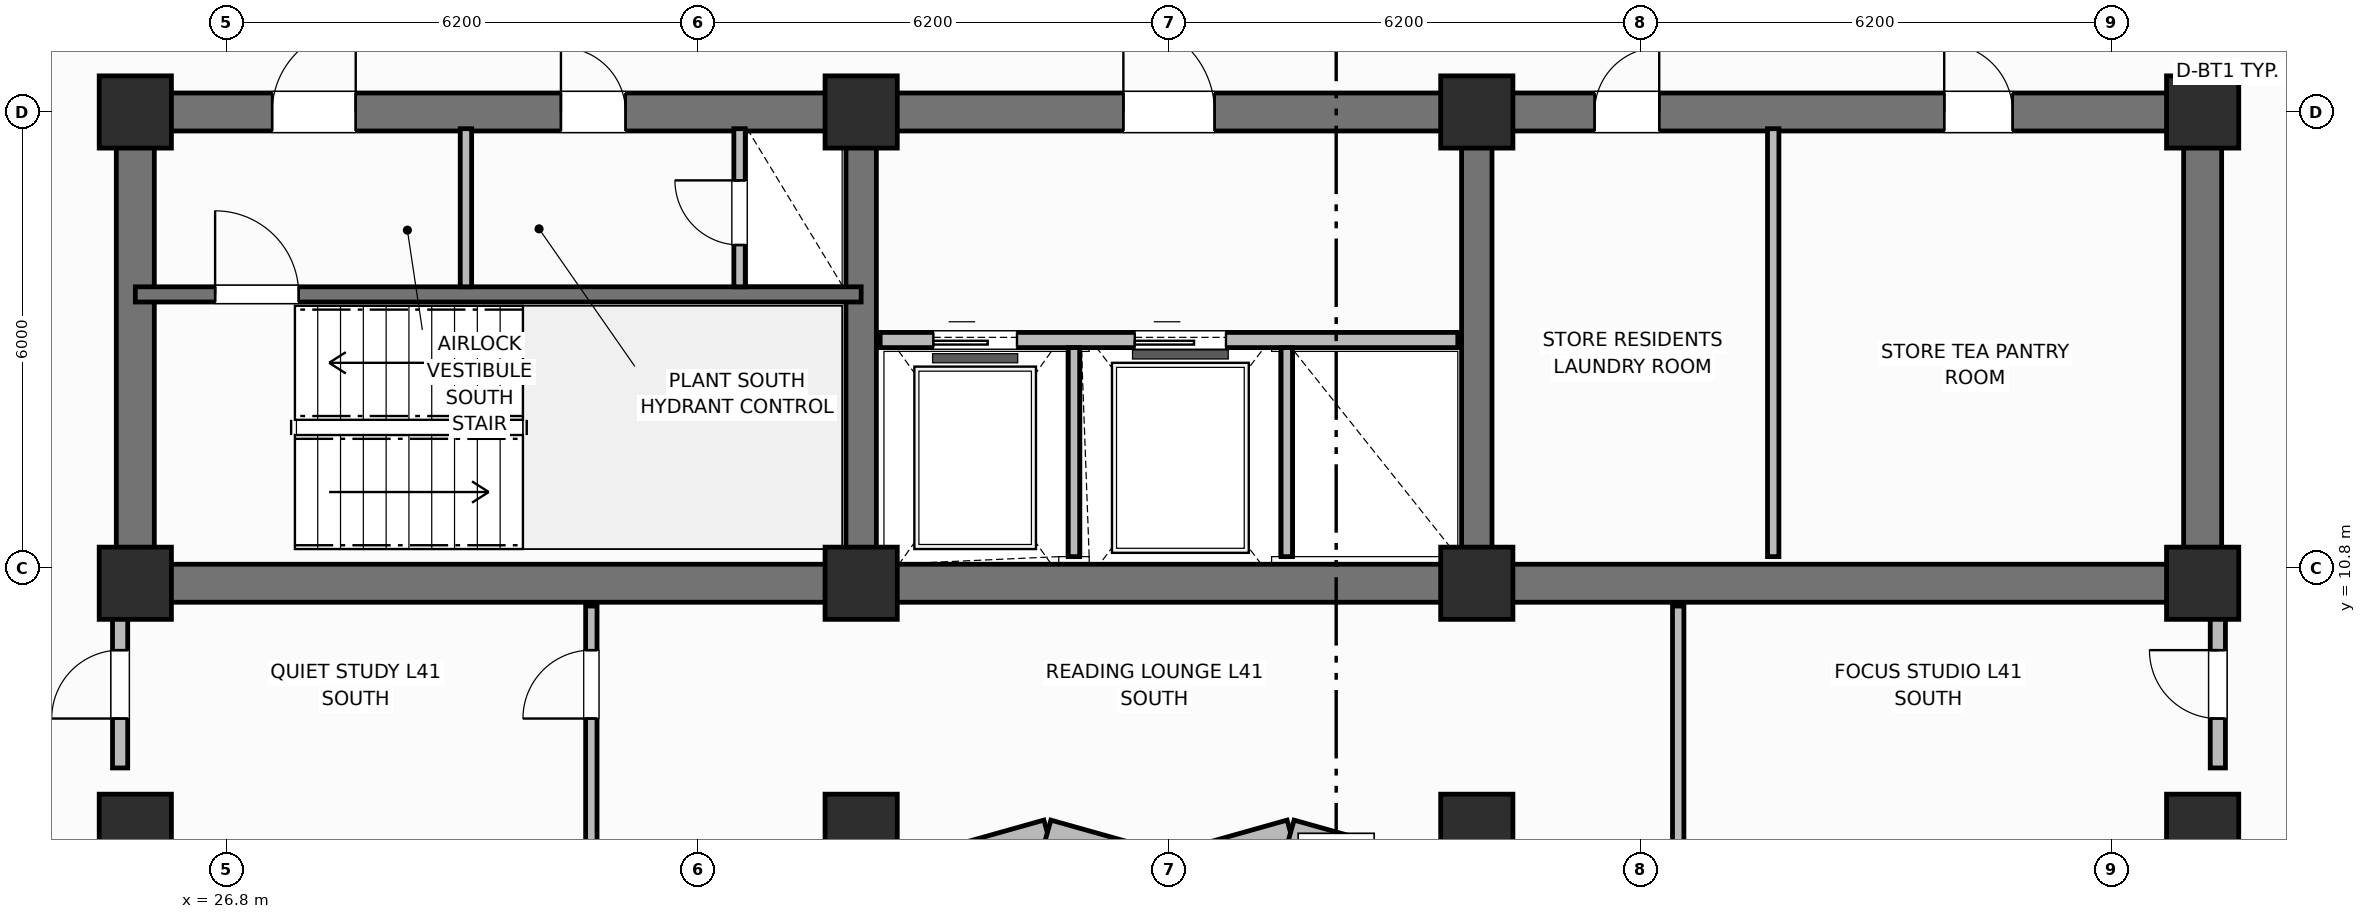
"""IFC4 building model, lengths in metres.
Left out: names, types, materials, properties, quantities, classifications, styles, units other than length and angle.
Written with IfcOpenShell. Run it as: python <this file> out.ifc"""

import sys

from ifc_helpers import new_model, si_unit, direction, frame, frame_2d, origin, origin_2d, place, context, subcontext, project, spatial, rectangle, extrude, element, fill, save


model = new_model("IFC4")
c1 = context("Model", 3, precision=1e-05, world=origin(), true_north=direction((0.0, 1.0)))
c2 = subcontext(c1, "Body", "Model", "MODEL_VIEW")
j1 = project(units=[si_unit("LENGTHUNIT", "METRE"), si_unit("PLANEANGLEUNIT", "RADIAN")], contexts=[c1])
p1 = place(None, origin())
s1 = spatial("IfcSite", under=j1, at=p1, CompositionType="ELEMENT")
p2 = place(p1, origin())
s2 = spatial("IfcBuilding", under=s1, at=p2, CompositionType="ELEMENT")
p3 = place(p2, frame((0.0, 0.0, 166.3)))
s3 = spatial("IfcBuildingStorey", under=s2, at=p3, CompositionType="ELEMENT", Elevation=166.3)
p4 = place(p3, frame((52.8, 10.6, 0.0), z_axis=(0.0, 0.0, 1.0), x_axis=(-1.0, 0.0, 0.0)))
e1 = element("IfcWall", 1, at=p4, inside=s3, PredefinedType="SHEAR", context=c2, shape_type="SweptSolid", body=[
    extrude(rectangle(XDim=27.2, YDim=0.5, at=frame_2d((13.6, 0.0))), origin(), (0.0, 0.0, 1.0), 3.7),
])
for number, where, z_axis, x_axis in (
    (2, (25.6, 10.85, 0.0), (0.0, 0.0, 1.0), (0.0, 1.0, 0.0)),
    (3, (52.8, 10.85, 0.0), (0.0, 0.0, 1.0), (0.0, 1.0, 0.0)),
):
    element("IfcWall", number, at=place(p3, frame(where, z_axis=z_axis, x_axis=x_axis)), inside=s3, PredefinedType="SHEAR", context=c2, shape_type="SweptSolid", body=[
        extrude(rectangle(XDim=5.7, YDim=0.5, at=frame_2d((2.85, 0.0))), origin(), (0.0, 0.0, 1.0), 3.7),
    ])
p5 = place(p3, frame((25.6, 16.8, 0.0), z_axis=(0.0, 0.0, 1.0), x_axis=(1.0, 0.0, 0.0)))
e4 = element("IfcWall", 4, at=p5, inside=s3, PredefinedType="SHEAR", context=c2, shape_type="SweptSolid", body=[
    extrude(rectangle(XDim=27.2, YDim=0.5, at=frame_2d((13.6, 0.0))), origin(), (0.0, 0.0, 1.0), 3.7),
])
p6 = place(p5, frame((1.8, 0.0, 0.0)))
e5 = element("IfcOpeningElement", 5, at=p6, cuts=e4, PredefinedType="OPENING", context=c2, shape_type="SweptSolid", body=[
    extrude(rectangle(XDim=1.1, YDim=2.15, at=frame_2d((0.55, 1.075))), frame((0.0, 0.26, 0.0), z_axis=(0.0, -1.0, 0.0), x_axis=(1.0, 0.0, 0.0)), (0.0, 0.0, 1.0), 0.52),
])
p7 = place(p5, frame((5.6, 0.0, 0.0)))
e6 = element("IfcOpeningElement", 6, at=p7, cuts=e4, PredefinedType="OPENING", context=c2, shape_type="SweptSolid", body=[
    extrude(rectangle(XDim=0.85, YDim=2.1, at=frame_2d((0.425, 1.05))), frame((0.0, 0.26, 0.0), z_axis=(0.0, -1.0, 0.0), x_axis=(1.0, 0.0, 0.0)), (0.0, 0.0, 1.0), 0.52),
])
p8 = place(p5, frame((13.0, 0.0, 0.0)))
e7 = element("IfcOpeningElement", 7, at=p8, cuts=e4, PredefinedType="OPENING", context=c2, shape_type="SweptSolid", body=[
    extrude(rectangle(XDim=1.2, YDim=2.15, at=frame_2d((0.6, 1.075))), frame((0.0, 0.26, 0.0), z_axis=(0.0, -1.0, 0.0), x_axis=(1.0, 0.0, 0.0)), (0.0, 0.0, 1.0), 0.52),
])
p9 = place(p5, frame((19.2, 0.0, 0.0)))
e8 = element("IfcOpeningElement", 8, at=p9, cuts=e4, PredefinedType="OPENING", context=c2, shape_type="SweptSolid", body=[
    extrude(rectangle(XDim=0.85, YDim=2.1, at=frame_2d((0.425, 1.05))), frame((0.0, 0.26, 0.0), z_axis=(0.0, -1.0, 0.0), x_axis=(1.0, 0.0, 0.0)), (0.0, 0.0, 1.0), 0.52),
])
p10 = place(p5, frame((23.8, 0.0, 0.0)))
e9 = element("IfcOpeningElement", 9, at=p10, cuts=e4, PredefinedType="OPENING", context=c2, shape_type="SweptSolid", body=[
    extrude(rectangle(XDim=0.9, YDim=2.1, at=frame_2d((0.45, 1.05))), frame((0.0, 0.26, 0.0), z_axis=(0.0, -1.0, 0.0), x_axis=(1.0, 0.0, 0.0)), (0.0, 0.0, 1.0), 0.52),
])
for number, where, z_axis, x_axis in (
    (10, (35.15, 10.85, 0.0), (0.0, 0.0, 1.0), (0.0, 1.0, 0.0)),
    (11, (43.25, 10.85, 0.0), (0.0, 0.0, 1.0), (0.0, 1.0, 0.0)),
):
    element("IfcWall", number, at=place(p3, frame(where, z_axis=z_axis, x_axis=x_axis)), inside=s3, PredefinedType="SHEAR", context=c2, shape_type="SweptSolid", body=[
        extrude(rectangle(XDim=5.7, YDim=0.4, at=frame_2d((2.85, 0.0))), origin(), (0.0, 0.0, 1.0), 3.7),
    ])
for number, where, z_axis, x_axis in (
    (12, (25.6, 10.6, 0.0), (0.0, 0.0, 1.0), (1.0, 0.0, 0.0)),
    (13, (25.6, 16.8, 0.0), (0.0, 0.0, 1.0), (1.0, 0.0, 0.0)),
    (14, (35.15, 10.6, 0.0), (0.0, 0.0, 1.0), (1.0, 0.0, 0.0)),
    (15, (35.15, 16.8, 0.0), (0.0, 0.0, 1.0), (1.0, 0.0, 0.0)),
    (16, (43.25, 10.6, 0.0), (0.0, 0.0, 1.0), (1.0, 0.0, 0.0)),
    (17, (43.25, 16.8, 0.0), (0.0, 0.0, 1.0), (1.0, 0.0, 0.0)),
    (18, (52.8, 10.6, 0.0), (0.0, 0.0, 1.0), (1.0, 0.0, 0.0)),
    (19, (52.8, 16.8, 0.0), (0.0, 0.0, 1.0), (1.0, 0.0, 0.0)),
    (20, (25.6, 7.35, 0.0), (0.0, 0.0, 1.0), (1.0, 0.0, 0.0)),
    (21, (35.15, 7.35, 0.0), (0.0, 0.0, 1.0), (1.0, 0.0, 0.0)),
    (22, (43.25, 7.35, 0.0), (0.0, 0.0, 1.0), (1.0, 0.0, 0.0)),
    (23, (52.8, 7.35, 0.0), (0.0, 0.0, 1.0), (1.0, 0.0, 0.0)),
):
    element("IfcColumn", number, at=place(p3, frame(where, z_axis=z_axis, x_axis=x_axis)), inside=s3, PredefinedType="COLUMN", context=c2, shape_type="SweptSolid", body=[
        extrude(rectangle(XDim=0.95, YDim=0.95, at=origin_2d()), origin(), (0.0, 0.0, 1.0), 3.7),
    ])
p11 = place(p3, frame((36.0, 6.87, 0.0), z_axis=(0.0, 0.0, 1.0), x_axis=(0.962662902433, 0.270703040766, 0.0)))
e24 = element("IfcWall", 24, at=p11, inside=s3, PredefinedType="SOLIDWALL", context=c2, shape_type="SweptSolid", body=[
    extrude(rectangle(XDim=1.662, YDim=0.34, at=frame_2d((0.831, 0.0))), origin(), (0.0, 0.0, 1.0), 2.72),
])
p12 = place(p3, frame((37.6, 7.32, 0.0), z_axis=(0.0, 0.0, 1.0), x_axis=(0.962652136636, -0.270741322725, 0.0)))
e25 = element("IfcWall", 25, at=p12, inside=s3, PredefinedType="SOLIDWALL", context=c2, shape_type="SweptSolid", body=[
    extrude(rectangle(XDim=1.662, YDim=0.34, at=frame_2d((0.831, 0.0))), origin(), (0.0, 0.0, 1.0), 2.72),
])
p13 = place(p3, frame((39.2, 6.87, 0.0), z_axis=(0.0, 0.0, 1.0), x_axis=(0.962662902433, 0.270703040766, 0.0)))
e26 = element("IfcWall", 26, at=p13, inside=s3, PredefinedType="SOLIDWALL", context=c2, shape_type="SweptSolid", body=[
    extrude(rectangle(XDim=1.662, YDim=0.34, at=frame_2d((0.831, 0.0))), origin(), (0.0, 0.0, 1.0), 2.72),
])
p14 = place(p3, frame((40.8, 7.32, 0.0), z_axis=(0.0, 0.0, 1.0), x_axis=(0.962652136636, -0.270741322725, 0.0)))
e27 = element("IfcWall", 27, at=p14, inside=s3, PredefinedType="SOLIDWALL", context=c2, shape_type="SweptSolid", body=[
    extrude(rectangle(XDim=1.662, YDim=0.34, at=frame_2d((0.831, 0.0))), origin(), (0.0, 0.0, 1.0), 2.72),
])
p15 = place(p3, frame((25.6, 14.4, 0.0), z_axis=(0.0, 0.0, 1.0), x_axis=(1.0, 0.0, 0.0)))
e28 = element("IfcWall", 28, at=p15, inside=s3, PredefinedType="SHEAR", context=c2, shape_type="SweptSolid", body=[
    extrude(rectangle(XDim=9.55, YDim=0.2, at=frame_2d((4.775, 0.0))), origin(), (0.0, 0.0, 1.0), 3.7),
])
p16 = place(p15, frame((1.05, 0.0, 0.0)))
e29 = element("IfcOpeningElement", 29, at=p16, cuts=e28, PredefinedType="OPENING", context=c2, shape_type="SweptSolid", body=[
    extrude(rectangle(XDim=1.1, YDim=2.15, at=frame_2d((0.55, 1.075))), frame((0.0, 0.11, 0.0), z_axis=(0.0, -1.0, 0.0), x_axis=(1.0, 0.0, 0.0)), (0.0, 0.0, 1.0), 0.22),
])
p17 = place(p3, frame((29.95, 14.5, 0.0), z_axis=(0.0, 0.0, 1.0), x_axis=(0.0, 1.0, 0.0)))
e30 = element("IfcWall", 30, at=p17, inside=s3, PredefinedType="PARTITIONING", context=c2, shape_type="SweptSolid", body=[
    extrude(rectangle(XDim=2.08, YDim=0.15, at=frame_2d((1.04, 0.0))), origin(), (0.0, 0.0, 1.0), 2.55),
])
p18 = place(p3, frame((33.55, 14.5, 0.0), z_axis=(0.0, 0.0, 1.0), x_axis=(0.0, 1.0, 0.0)))
e31 = element("IfcWall", 31, at=p18, inside=s3, PredefinedType="PARTITIONING", context=c2, shape_type="SweptSolid", body=[
    extrude(rectangle(XDim=2.08, YDim=0.15, at=frame_2d((1.04, 0.0))), origin(), (0.0, 0.0, 1.0), 2.55),
])
p19 = place(p18, frame((0.55, 0.0, 0.0)))
e32 = element("IfcOpeningElement", 32, at=p19, cuts=e31, PredefinedType="OPENING", context=c2, shape_type="SweptSolid", body=[
    extrude(rectangle(XDim=0.85, YDim=2.05, at=frame_2d((0.425, 1.025))), frame((0.0, 0.085, 0.0), z_axis=(0.0, -1.0, 0.0), x_axis=(1.0, 0.0, 0.0)), (0.0, 0.0, 1.0), 0.17),
])
p20 = place(p3, frame((35.4, 13.8, 0.0), z_axis=(0.0, 0.0, 1.0), x_axis=(1.0, 0.0, 0.0)))
e33 = element("IfcWall", 33, at=p20, inside=s3, PredefinedType="PARTITIONING", context=c2, shape_type="SweptSolid", body=[
    extrude(rectangle(XDim=7.6, YDim=0.2, at=frame_2d((3.8, 0.0))), origin(), (0.0, 0.0, 1.0), 2.32),
])
p21 = place(p20, frame((0.7, 0.0, 0.0)))
e34 = element("IfcOpeningElement", 34, at=p21, cuts=e33, PredefinedType="OPENING", context=c2, shape_type="SweptSolid", body=[
    extrude(rectangle(XDim=1.1, YDim=2.15, at=frame_2d((0.55, 1.075))), frame((0.0, 0.11, 0.0), z_axis=(0.0, -1.0, 0.0), x_axis=(1.0, 0.0, 0.0)), (0.0, 0.0, 1.0), 0.22),
])
p22 = place(p20, frame((3.35, 0.0, 0.0)))
e35 = element("IfcOpeningElement", 35, at=p22, cuts=e33, PredefinedType="OPENING", context=c2, shape_type="SweptSolid", body=[
    extrude(rectangle(XDim=1.2, YDim=2.15, at=frame_2d((0.6, 1.075))), frame((0.0, 0.11, 0.0), z_axis=(0.0, -1.0, 0.0), x_axis=(1.0, 0.0, 0.0)), (0.0, 0.0, 1.0), 0.22),
])
for number, where, z_axis, x_axis in (
    (36, (37.95, 10.95, 0.0), (0.0, 0.0, 1.0), (0.0, 1.0, 0.0)),
    (37, (40.75, 10.95, 0.0), (0.0, 0.0, 1.0), (0.0, 1.0, 0.0)),
):
    element("IfcWall", number, at=place(p3, frame(where, z_axis=z_axis, x_axis=x_axis)), inside=s3, PredefinedType="PARTITIONING", context=c2, shape_type="SweptSolid", body=[
        extrude(rectangle(XDim=2.75, YDim=0.15, at=frame_2d((1.375, 0.0))), origin(), (0.0, 0.0, 1.0), 2.55),
    ])
p23 = place(p3, frame((47.15, 10.95, 0.0), z_axis=(0.0, 0.0, 1.0), x_axis=(0.0, 1.0, 0.0)))
e38 = element("IfcWall", 38, at=p23, inside=s3, PredefinedType="PARTITIONING", context=c2, shape_type="SweptSolid", body=[
    extrude(rectangle(XDim=5.63, YDim=0.15, at=frame_2d((2.815, 0.0))), origin(), (0.0, 0.0, 1.0), 2.55),
])
p24 = place(p3, frame((31.6, 6.87, 0.0), z_axis=(0.0, 0.0, 1.0), x_axis=(0.0, 1.0, 0.0)))
e39 = element("IfcWall", 39, at=p24, inside=s3, PredefinedType="PARTITIONING", context=c2, shape_type="SweptSolid", body=[
    extrude(rectangle(XDim=3.43, YDim=0.15, at=frame_2d((1.715, 0.0))), origin(), (0.0, 0.0, 1.0), 2.55),
])
p25 = place(p24, frame((1.95, 0.0, 0.0)))
e40 = element("IfcOpeningElement", 40, at=p25, cuts=e39, PredefinedType="OPENING", context=c2, shape_type="SweptSolid", body=[
    extrude(rectangle(XDim=0.9, YDim=2.1, at=frame_2d((0.45, 1.05))), frame((0.0, 0.085, 0.0), z_axis=(0.0, -1.0, 0.0), x_axis=(1.0, 0.0, 0.0)), (0.0, 0.0, 1.0), 0.17),
])
p26 = place(p3, frame((45.9, 6.87, 0.0), z_axis=(0.0, 0.0, 1.0), x_axis=(0.0, 1.0, 0.0)))
e41 = element("IfcWall", 41, at=p26, inside=s3, PredefinedType="PARTITIONING", context=c2, shape_type="SweptSolid", body=[
    extrude(rectangle(XDim=3.43, YDim=0.15, at=frame_2d((1.715, 0.0))), origin(), (0.0, 0.0, 1.0), 2.55),
])
p27 = place(p3, frame((25.4, 8.17, 0.0), z_axis=(0.0, 0.0, 1.0), x_axis=(0.0, 1.0, 0.0)))
e42 = element("IfcWall", 42, at=p27, inside=s3, PredefinedType="PARTITIONING", context=c2, shape_type="SweptSolid", body=[
    extrude(rectangle(XDim=2.13, YDim=0.2, at=frame_2d((1.065, 0.0))), origin(), (0.0, 0.0, 1.0), 2.55),
])
p28 = place(p27, frame((0.65, 0.0, 0.0)))
e43 = element("IfcOpeningElement", 43, at=p28, cuts=e42, PredefinedType="OPENING", context=c2, shape_type="SweptSolid", body=[
    extrude(rectangle(XDim=0.9, YDim=2.1, at=frame_2d((0.45, 1.05))), frame((0.0, 0.11, 0.0), z_axis=(0.0, -1.0, 0.0), x_axis=(1.0, 0.0, 0.0)), (0.0, 0.0, 1.0), 0.22),
])
p29 = place(p3, frame((53.0, 8.17, 0.0), z_axis=(0.0, 0.0, 1.0), x_axis=(0.0, 1.0, 0.0)))
e44 = element("IfcWall", 44, at=p29, inside=s3, PredefinedType="PARTITIONING", context=c2, shape_type="SweptSolid", body=[
    extrude(rectangle(XDim=2.13, YDim=0.2, at=frame_2d((1.065, 0.0))), origin(), (0.0, 0.0, 1.0), 2.55),
])
p30 = place(p29, frame((0.65, 0.0, 0.0)))
e45 = element("IfcOpeningElement", 45, at=p30, cuts=e44, PredefinedType="OPENING", context=c2, shape_type="SweptSolid", body=[
    extrude(rectangle(XDim=0.9, YDim=2.1, at=frame_2d((0.45, 1.05))), frame((0.0, 0.11, 0.0), z_axis=(0.0, -1.0, 0.0), x_axis=(1.0, 0.0, 0.0)), (0.0, 0.0, 1.0), 0.22),
])
p31 = place(p16, origin())
e46 = element("IfcDoor", 46, at=p31, inside=s3, OperationType="SINGLE_SWING_LEFT", PredefinedType="DOOR", context=c2, shape_type="SweptSolid", body=[
    extrude(rectangle(XDim=1.1, YDim=2.15, at=frame_2d((0.55, 1.075))), frame((0.0, 0.025, 0.0), z_axis=(0.0, -1.0, 0.0), x_axis=(1.0, 0.0, 0.0)), (0.0, 0.0, 1.0), 0.05),
])
fill(e29, e46)
p32 = place(p19, origin())
e47 = element("IfcDoor", 47, at=p32, inside=s3, OperationType="SINGLE_SWING_RIGHT", PredefinedType="TRAPDOOR", context=c2, shape_type="SweptSolid", body=[
    extrude(rectangle(XDim=0.85, YDim=2.05, at=frame_2d((0.425, 1.025))), frame((0.0, 0.025, 0.0), z_axis=(0.0, -1.0, 0.0), x_axis=(1.0, 0.0, 0.0)), (0.0, 0.0, 1.0), 0.05),
])
fill(e32, e47)
p33 = place(p21, origin())
e48 = element("IfcDoor", 48, at=p33, inside=s3, OperationType="SLIDING_TO_LEFT", PredefinedType="DOOR", context=c2, shape_type="SweptSolid", body=[
    extrude(rectangle(XDim=1.1, YDim=2.15, at=frame_2d((0.55, 1.075))), frame((0.0, 0.025, 0.0), z_axis=(0.0, -1.0, 0.0), x_axis=(1.0, 0.0, 0.0)), (0.0, 0.0, 1.0), 0.05),
])
fill(e34, e48)
p34 = place(p22, origin())
e49 = element("IfcDoor", 49, at=p34, inside=s3, OperationType="SLIDING_TO_LEFT", PredefinedType="DOOR", context=c2, shape_type="SweptSolid", body=[
    extrude(rectangle(XDim=1.2, YDim=2.15, at=frame_2d((0.6, 1.075))), frame((0.0, 0.025, 0.0), z_axis=(0.0, -1.0, 0.0), x_axis=(1.0, 0.0, 0.0)), (0.0, 0.0, 1.0), 0.05),
])
fill(e35, e49)
p35 = place(p25, origin())
e50 = element("IfcDoor", 50, at=p35, inside=s3, OperationType="SINGLE_SWING_LEFT", PredefinedType="DOOR", context=c2, shape_type="SweptSolid", body=[
    extrude(rectangle(XDim=0.9, YDim=2.1, at=frame_2d((0.45, 1.05))), frame((0.0, 0.025, 0.0), z_axis=(0.0, -1.0, 0.0), x_axis=(1.0, 0.0, 0.0)), (0.0, 0.0, 1.0), 0.05),
])
fill(e40, e50)
p36 = place(p28, origin())
e51 = element("IfcDoor", 51, at=p36, inside=s3, OperationType="SINGLE_SWING_LEFT", PredefinedType="DOOR", context=c2, shape_type="SweptSolid", body=[
    extrude(rectangle(XDim=0.9, YDim=2.1, at=frame_2d((0.45, 1.05))), frame((0.0, 0.025, 0.0), z_axis=(0.0, -1.0, 0.0), x_axis=(1.0, 0.0, 0.0)), (0.0, 0.0, 1.0), 0.05),
])
fill(e43, e51)
p37 = place(p30, origin())
e52 = element("IfcDoor", 52, at=p37, inside=s3, OperationType="SINGLE_SWING_RIGHT", PredefinedType="DOOR", context=c2, shape_type="SweptSolid", body=[
    extrude(rectangle(XDim=0.9, YDim=2.1, at=frame_2d((0.45, 1.05))), frame((0.0, 0.025, 0.0), z_axis=(0.0, -1.0, 0.0), x_axis=(1.0, 0.0, 0.0)), (0.0, 0.0, 1.0), 0.05),
])
fill(e45, e52)
p38 = place(p6, origin())
e53 = element("IfcDoor", 53, at=p38, inside=s3, OperationType="SINGLE_SWING_RIGHT", PredefinedType="DOOR", context=c2, shape_type="SweptSolid", body=[
    extrude(rectangle(XDim=1.1, YDim=2.15, at=frame_2d((0.55, 1.075))), frame((0.0, 0.025, 0.0), z_axis=(0.0, -1.0, 0.0), x_axis=(1.0, 0.0, 0.0)), (0.0, 0.0, 1.0), 0.05),
])
fill(e5, e53)
p39 = place(p7, origin())
e54 = element("IfcDoor", 54, at=p39, inside=s3, OperationType="SINGLE_SWING_LEFT", PredefinedType="DOOR", context=c2, shape_type="SweptSolid", body=[
    extrude(rectangle(XDim=0.85, YDim=2.1, at=frame_2d((0.425, 1.05))), frame((0.0, 0.025, 0.0), z_axis=(0.0, -1.0, 0.0), x_axis=(1.0, 0.0, 0.0)), (0.0, 0.0, 1.0), 0.05),
])
fill(e6, e54)
p40 = place(p8, origin())
e55 = element("IfcDoor", 55, at=p40, inside=s3, OperationType="SINGLE_SWING_LEFT", PredefinedType="DOOR", context=c2, shape_type="SweptSolid", body=[
    extrude(rectangle(XDim=1.2, YDim=2.15, at=frame_2d((0.6, 1.075))), frame((0.0, 0.025, 0.0), z_axis=(0.0, -1.0, 0.0), x_axis=(1.0, 0.0, 0.0)), (0.0, 0.0, 1.0), 0.05),
])
fill(e7, e55)
p41 = place(p9, origin())
e56 = element("IfcDoor", 56, at=p41, inside=s3, OperationType="SINGLE_SWING_RIGHT", PredefinedType="DOOR", context=c2, shape_type="SweptSolid", body=[
    extrude(rectangle(XDim=0.85, YDim=2.1, at=frame_2d((0.425, 1.05))), frame((0.0, 0.025, 0.0), z_axis=(0.0, -1.0, 0.0), x_axis=(1.0, 0.0, 0.0)), (0.0, 0.0, 1.0), 0.05),
])
fill(e8, e56)
p42 = place(p10, origin())
e57 = element("IfcDoor", 57, at=p42, inside=s3, OperationType="SINGLE_SWING_LEFT", PredefinedType="DOOR", context=c2, shape_type="SweptSolid", body=[
    extrude(rectangle(XDim=0.9, YDim=2.1, at=frame_2d((0.45, 1.05))), frame((0.0, 0.025, 0.0), z_axis=(0.0, -1.0, 0.0), x_axis=(1.0, 0.0, 0.0)), (0.0, 0.0, 1.0), 0.05),
])
fill(e9, e57)
save(model, sys.argv[1])
